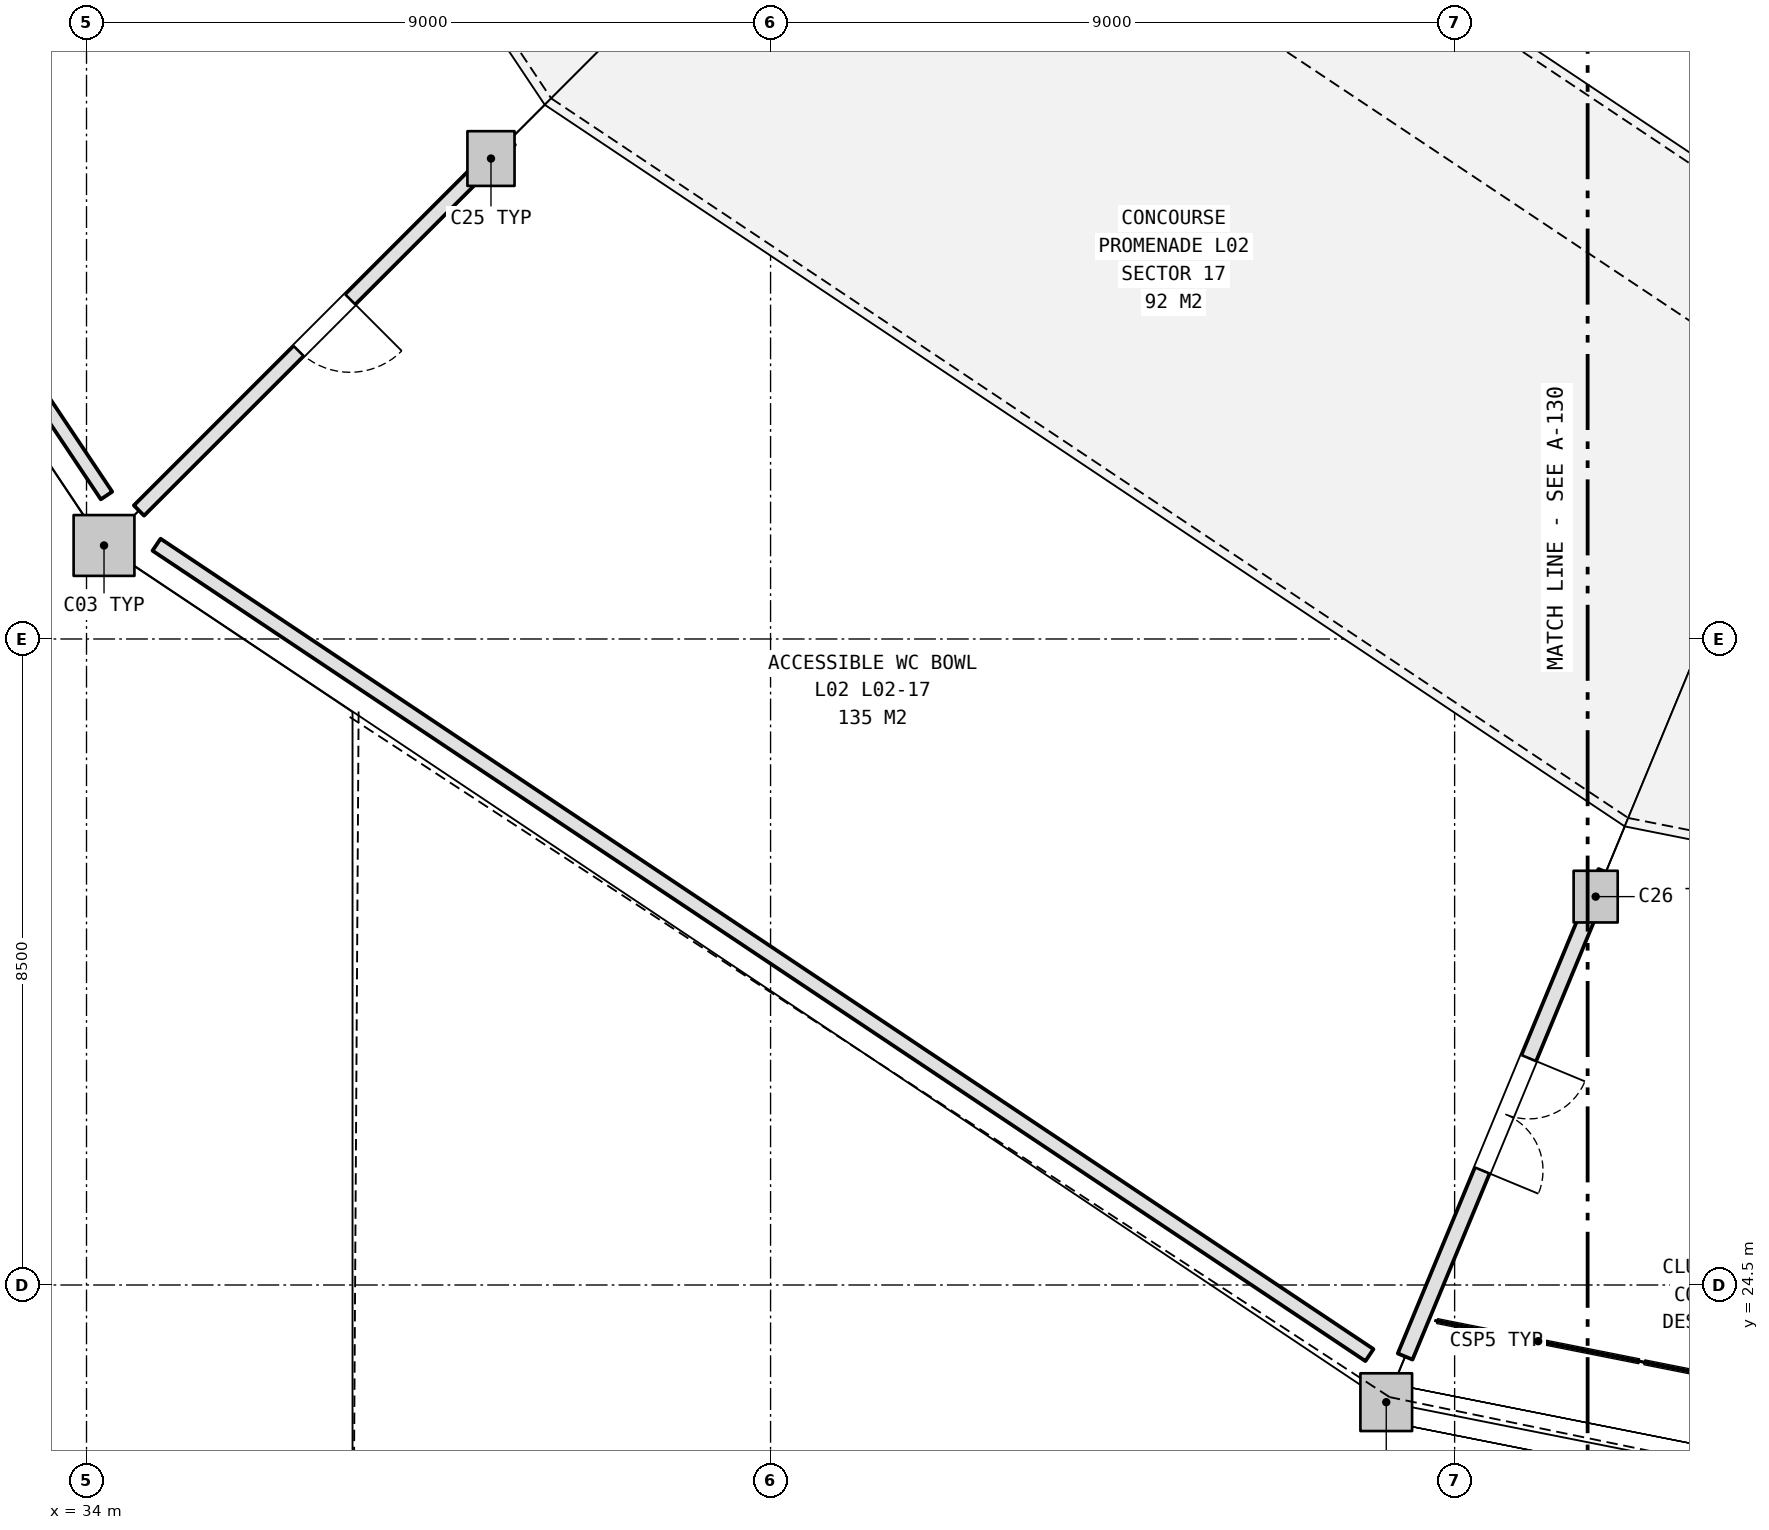
"""IFC4 building model, lengths in metres.
Left out: names, types, materials, properties, quantities, classifications, styles, units other than length and angle.
Written with IfcOpenShell. Run it as: python <this file> out.ifc"""

import sys

from ifc_helpers import new_model, si_unit, direction, frame, frame_2d, origin, origin_2d, place, context, subcontext, project, spatial, rectangle, extrude, element, fill, save


model = new_model("IFC4")
c1 = context("Model", 3, precision=1e-05, world=origin(), true_north=direction((0.0, 1.0)))
c2 = subcontext(c1, "Body", "Model", "MODEL_VIEW")
j1 = project(units=[si_unit("LENGTHUNIT", "METRE"), si_unit("PLANEANGLEUNIT", "RADIAN")], contexts=[c1])
p1 = place(None, origin())
s1 = spatial("IfcSite", under=j1, at=p1, CompositionType="ELEMENT")
p2 = place(p1, origin())
s2 = spatial("IfcBuilding", under=s1, at=p2, CompositionType="ELEMENT")
p3 = place(p2, frame((0.0, 0.0, 10.8)))
s3 = spatial("IfcBuildingStorey", under=s2, at=p3, CompositionType="ELEMENT", Elevation=10.8)
p4 = place(p3, frame((39.322, 39.322, 0.0), z_axis=(0.0, 0.0, 1.0), x_axis=(1.0, 0.0, 0.0)))
e1 = element("IfcColumn", 1, at=p4, inside=s3, PredefinedType="COLUMN", context=c2, shape_type="SweptSolid", body=[
    extrude(rectangle(XDim=0.62, YDim=0.72, at=origin_2d()), origin(), (0.0, 0.0, 1.0), 5.4),
])
p5 = place(p3, frame((34.23, 34.23, 0.0), z_axis=(0.0, 0.0, 1.0), x_axis=(1.0, 0.0, 0.0)))
e2 = element("IfcColumn", 2, at=p5, inside=s3, PredefinedType="COLUMN", context=c2, shape_type="SweptSolid", body=[
    extrude(rectangle(XDim=0.8, YDim=0.8, at=origin_2d()), origin(), (0.0, 0.0, 1.0), 5.4),
])
p6 = place(p3, frame((53.856, 29.61, 0.0), z_axis=(0.0, 0.0, 1.0), x_axis=(1.0, 0.0, 0.0)))
e3 = element("IfcColumn", 3, at=p6, inside=s3, PredefinedType="COLUMN", context=c2, shape_type="SweptSolid", body=[
    extrude(rectangle(XDim=0.58, YDim=0.68, at=origin_2d()), origin(), (0.0, 0.0, 1.0), 5.4),
])
p7 = place(p3, frame((51.1, 22.958, 0.0), z_axis=(0.0, 0.0, 1.0), x_axis=(1.0, 0.0, 0.0)))
e4 = element("IfcColumn", 4, at=p7, inside=s3, PredefinedType="COLUMN", context=c2, shape_type="SweptSolid", body=[
    extrude(rectangle(XDim=0.68, YDim=0.76, at=origin_2d()), origin(), (0.0, 0.0, 1.0), 5.4),
])
p8 = place(p3, frame((39.569, 39.569, 0.0), z_axis=(0.0, 0.0, 1.0), x_axis=(-0.707106781187, -0.707106781187, 0.0)))
e5 = element("IfcWall", 5, at=p8, inside=s3, PredefinedType="PARTITIONING", context=c2, shape_type="SweptSolid", body=[
    extrude(rectangle(XDim=6.9, YDim=0.19, at=frame_2d((3.45, 0.0))), origin(), (0.0, 0.0, 1.0), 4.255),
])
p9 = place(p8, frame((2.97, 0.0, 0.0)))
e6 = element("IfcOpeningElement", 6, at=p9, cuts=e5, PredefinedType="OPENING", context=c2, shape_type="SweptSolid", body=[
    extrude(rectangle(XDim=0.96, YDim=2.15, at=frame_2d((0.48, 1.075))), frame((0.0, 0.105, 0.0), z_axis=(0.0, -1.0, 0.0), x_axis=(1.0, 0.0, 0.0)), (0.0, 0.0, 1.0), 0.21),
])
p10 = place(p3, frame((34.263, 34.887, 0.0), z_axis=(0.0, 0.0, 1.0), x_axis=(-0.555562946988, 0.831474480627, 0.0)))
e7 = element("IfcWall", 7, at=p10, inside=s3, PredefinedType="PARTITIONING", context=c2, shape_type="SweptSolid", body=[
    extrude(rectangle(XDim=19.192, YDim=0.18, at=frame_2d((9.596, 0.0))), origin(), (0.0, 0.0, 1.0), 5.12),
])
p11 = place(p3, frame((53.99, 29.934, 0.0), z_axis=(0.0, 0.0, 1.0), x_axis=(-0.38269761686, -0.923873656974, 0.0)))
e8 = element("IfcWall", 8, at=p11, inside=s3, PredefinedType="PLUMBINGWALL", context=c2, shape_type="SweptSolid", body=[
    extrude(rectangle(XDim=6.9, YDim=0.21, at=frame_2d((3.45, 0.0))), origin(), (0.0, 0.0, 1.0), 4.285),
])
p12 = place(p11, frame((2.65, 0.0, 0.0)))
e9 = element("IfcOpeningElement", 9, at=p12, cuts=e8, PredefinedType="OPENING", context=c2, shape_type="SweptSolid", body=[
    extrude(rectangle(XDim=1.6, YDim=2.2, at=frame_2d((0.8, 1.1))), frame((0.0, 0.115, 0.0), z_axis=(0.0, -1.0, 0.0), x_axis=(1.0, 0.0, 0.0)), (0.0, 0.0, 1.0), 0.23),
])
p13 = place(p3, frame((50.879, 23.578, 0.0), z_axis=(0.0, 0.0, 1.0), x_axis=(-0.831474480627, 0.555562946988, 0.0)))
e10 = element("IfcWall", 10, at=p13, inside=s3, PredefinedType="PARTITIONING", context=c2, shape_type="SweptSolid", body=[
    extrude(rectangle(XDim=19.192, YDim=0.19, at=frame_2d((9.596, 0.0))), origin(), (0.0, 0.0, 1.0), 5.12),
])
p14 = place(p9, origin())
e11 = element("IfcDoor", 11, at=p14, inside=s3, OperationType="SINGLE_SWING_LEFT", PredefinedType="DOOR", context=c2, shape_type="SweptSolid", body=[
    extrude(rectangle(XDim=0.96, YDim=2.15, at=frame_2d((0.48, 1.075))), frame((0.0, 0.025, 0.0), z_axis=(0.0, -1.0, 0.0), x_axis=(1.0, 0.0, 0.0)), (0.0, 0.0, 1.0), 0.05),
])
fill(e6, e11)
p15 = place(p12, origin())
e12 = element("IfcDoor", 12, at=p15, inside=s3, OperationType="DOUBLE_DOOR_SINGLE_SWING", PredefinedType="DOOR", context=c2, shape_type="SweptSolid", body=[
    extrude(rectangle(XDim=1.6, YDim=2.2, at=frame_2d((0.8, 1.1))), frame((0.0, 0.025, 0.0), z_axis=(0.0, -1.0, 0.0), x_axis=(1.0, 0.0, 0.0)), (0.0, 0.0, 1.0), 0.05),
])
fill(e9, e12)
save(model, sys.argv[1])
